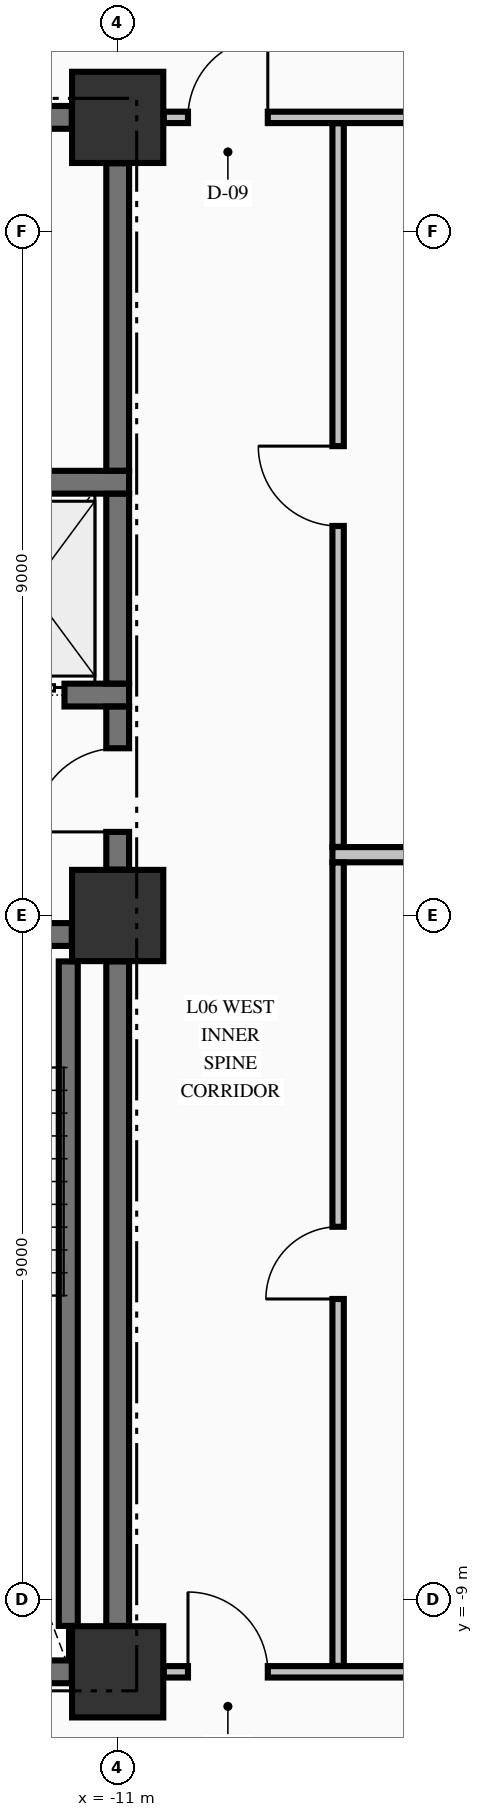
"""IFC4 building model, lengths in metres.
Left out: names, types, materials, properties, quantities, classifications, styles, units other than length and angle.
Written with IfcOpenShell. Run it as: python <this file> out.ifc"""

import sys

from ifc_helpers import new_model, si_unit, direction, frame, frame_2d, origin, origin_2d, place, context, subcontext, project, spatial, rectangle, extrude, element, fill, save


model = new_model("IFC4")
c1 = context("Model", 3, precision=1e-05, world=origin(), true_north=direction((0.0, 1.0)))
c2 = subcontext(c1, "Body", "Model", "MODEL_VIEW")
j1 = project(units=[si_unit("LENGTHUNIT", "METRE"), si_unit("PLANEANGLEUNIT", "RADIAN")], contexts=[c1])
p1 = place(None, origin())
s1 = spatial("IfcSite", under=j1, at=p1, CompositionType="ELEMENT")
p2 = place(p1, origin())
s2 = spatial("IfcBuilding", under=s1, at=p2, CompositionType="ELEMENT")
p3 = place(p2, frame((0.0, 0.0, 30.77)))
s3 = spatial("IfcBuildingStorey", under=s2, at=p3, CompositionType="ELEMENT", Elevation=30.77)
for number, where, z_axis, x_axis in (
    (1, (-11.0, -9.95, -0.25), (0.0, 0.0, 1.0), (1.0, 0.0, 0.0)),
    (2, (-11.0, 0.0, -0.25), (0.0, 0.0, 1.0), (1.0, 0.0, 0.0)),
    (3, (-11.0, 10.5, -0.25), (0.0, 0.0, 1.0), (1.0, 0.0, 0.0)),
):
    element("IfcColumn", number, at=place(p3, frame(where, z_axis=z_axis, x_axis=x_axis)), inside=s3, PredefinedType="COLUMN", context=c2, shape_type="SweptSolid", body=[
        extrude(rectangle(XDim=1.2, YDim=1.2, at=origin_2d()), origin(), (0.0, 0.0, 1.0), 3.52),
    ])
p4 = place(p3, frame((-14.7, -9.95, 0.0), z_axis=(0.0, 0.0, 1.0), x_axis=(1.0, 0.0, 0.0)))
e4 = element("IfcWall", 4, at=p4, inside=s3, PredefinedType="SHEAR", context=c2, shape_type="SweptSolid", body=[
    extrude(rectangle(XDim=3.096, YDim=0.3, at=frame_2d((1.548, 0.0))), origin(), (0.0, 0.0, 1.0), 3.27),
])
p5 = place(p3, frame((-19.396, -0.25, 0.0), z_axis=(0.0, 0.0, 1.0), x_axis=(1.0, 0.0, 0.0)))
e5 = element("IfcWall", 5, at=p5, inside=s3, PredefinedType="SHEAR", context=c2, shape_type="SweptSolid", body=[
    extrude(rectangle(XDim=7.792, YDim=0.3, at=frame_2d((3.896, 0.0))), origin(), (0.0, 0.0, 1.0), 3.27),
])
p6 = place(p5, frame((5.696, 0.0, 0.0)))
e6 = element("IfcOpeningElement", 6, at=p6, cuts=e5, PredefinedType="OPENING", context=c2, shape_type="SweptSolid", body=[
    extrude(rectangle(XDim=1.1, YDim=2.15, at=frame_2d((0.55, 1.075))), frame((0.0, 0.16, 0.0), z_axis=(0.0, -1.0, 0.0), x_axis=(1.0, 0.0, 0.0)), (0.0, 0.0, 1.0), 0.32),
])
p7 = place(p3, frame((-14.875, 2.9, 0.0), z_axis=(0.0, 0.0, 1.0), x_axis=(1.0, 0.0, 0.0)))
e7 = element("IfcWall", 7, at=p7, inside=s3, PredefinedType="SHEAR", context=c2, shape_type="SweptSolid", body=[
    extrude(rectangle(XDim=4.025, YDim=0.3, at=frame_2d((2.012, 0.0))), origin(), (0.0, 0.0, 1.0), 3.27),
])
p8 = place(p7, frame((2.075, 0.0, 0.0)))
e8 = element("IfcOpeningElement", 8, at=p8, cuts=e7, PredefinedType="OPENING", context=c2, shape_type="SweptSolid", body=[
    extrude(rectangle(XDim=1.1, YDim=2.2, at=frame_2d((0.55, 1.1))), frame((0.0, 0.16, 0.0), z_axis=(0.0, -1.0, 0.0), x_axis=(1.0, 0.0, 0.0)), (0.0, 0.0, 1.0), 0.32),
])
p9 = place(p3, frame((-14.875, 5.7, 0.0), z_axis=(0.0, 0.0, 1.0), x_axis=(1.0, 0.0, 0.0)))
e9 = element("IfcWall", 9, at=p9, inside=s3, PredefinedType="SHEAR", context=c2, shape_type="SweptSolid", body=[
    extrude(rectangle(XDim=4.025, YDim=0.3, at=frame_2d((2.012, 0.0))), origin(), (0.0, 0.0, 1.0), 3.27),
])
p10 = place(p3, frame((-14.7, 10.5, 0.0), z_axis=(0.0, 0.0, 1.0), x_axis=(1.0, 0.0, 0.0)))
e10 = element("IfcWall", 10, at=p10, inside=s3, PredefinedType="SHEAR", context=c2, shape_type="SweptSolid", body=[
    extrude(rectangle(XDim=3.096, YDim=0.3, at=frame_2d((1.548, 0.0))), origin(), (0.0, 0.0, 1.0), 3.27),
])
p11 = place(p10, frame((0.775, 0.0, 0.0)))
e11 = element("IfcOpeningElement", 11, at=p11, cuts=e10, PredefinedType="OPENING", context=c2, shape_type="SweptSolid", body=[
    extrude(rectangle(XDim=0.95, YDim=2.15, at=frame_2d((0.475, 1.075))), frame((0.0, 0.16, 0.0), z_axis=(0.0, -1.0, 0.0), x_axis=(1.0, 0.0, 0.0)), (0.0, 0.0, 1.0), 0.32),
])
p12 = place(p3, frame((-10.394, -9.95, 0.0), z_axis=(0.0, 0.0, 1.0), x_axis=(1.0, 0.0, 0.0)))
e12 = element("IfcWall", 12, at=p12, inside=s3, PredefinedType="PARTITIONING", context=c2, shape_type="SweptSolid", body=[
    extrude(rectangle(XDim=20.788, YDim=0.15, at=frame_2d((10.394, 0.0))), origin(), (0.0, 0.0, 1.0), 3.27),
])
p13 = place(p12, frame((0.319, 0.0, 0.0)))
e13 = element("IfcOpeningElement", 13, at=p13, cuts=e12, PredefinedType="OPENING", context=c2, shape_type="SweptSolid", body=[
    extrude(rectangle(XDim=1.05, YDim=2.15, at=frame_2d((0.525, 1.075))), frame((0.0, 0.085, 0.0), z_axis=(0.0, -1.0, 0.0), x_axis=(1.0, 0.0, 0.0)), (0.0, 0.0, 1.0), 0.17),
])
p14 = place(p12, frame((19.419, 0.0, 0.0)))
e14 = element("IfcOpeningElement", 14, at=p14, cuts=e12, PredefinedType="OPENING", context=c2, shape_type="SweptSolid", body=[
    extrude(rectangle(XDim=1.05, YDim=2.15, at=frame_2d((0.525, 1.075))), frame((0.0, 0.085, 0.0), z_axis=(0.0, -1.0, 0.0), x_axis=(1.0, 0.0, 0.0)), (0.0, 0.0, 1.0), 0.17),
])
p15 = place(p12, frame((11.569, 0.0, 0.0)))
e15 = element("IfcOpeningElement", 15, at=p15, cuts=e12, PredefinedType="OPENING", context=c2, shape_type="SweptSolid", body=[
    extrude(rectangle(XDim=0.95, YDim=2.15, at=frame_2d((0.475, 1.075))), frame((0.0, 0.085, 0.0), z_axis=(0.0, -1.0, 0.0), x_axis=(1.0, 0.0, 0.0)), (0.0, 0.0, 1.0), 0.17),
])
p16 = place(p3, frame((-8.175, 0.8, 0.0), z_axis=(0.0, 0.0, 1.0), x_axis=(1.0, 0.0, 0.0)))
e16 = element("IfcWall", 16, at=p16, inside=s3, PredefinedType="PARTITIONING", context=c2, shape_type="SweptSolid", body=[
    extrude(rectangle(XDim=6.475, YDim=0.2, at=frame_2d((3.238, 0.0))), origin(), (0.0, 0.0, 1.0), 3.27),
])
p17 = place(p3, frame((-10.394, 10.5, 0.0), z_axis=(0.0, 0.0, 1.0), x_axis=(1.0, 0.0, 0.0)))
e17 = element("IfcWall", 17, at=p17, inside=s3, PredefinedType="PARTITIONING", context=c2, shape_type="SweptSolid", body=[
    extrude(rectangle(XDim=20.788, YDim=0.15, at=frame_2d((10.394, 0.0))), origin(), (0.0, 0.0, 1.0), 3.27),
])
p18 = place(p17, frame((0.319, 0.0, 0.0)))
e18 = element("IfcOpeningElement", 18, at=p18, cuts=e17, PredefinedType="OPENING", context=c2, shape_type="SweptSolid", body=[
    extrude(rectangle(XDim=1.05, YDim=2.15, at=frame_2d((0.525, 1.075))), frame((0.0, 0.085, 0.0), z_axis=(0.0, -1.0, 0.0), x_axis=(1.0, 0.0, 0.0)), (0.0, 0.0, 1.0), 0.17),
])
p19 = place(p17, frame((19.419, 0.0, 0.0)))
e19 = element("IfcOpeningElement", 19, at=p19, cuts=e17, PredefinedType="OPENING", context=c2, shape_type="SweptSolid", body=[
    extrude(rectangle(XDim=1.05, YDim=2.15, at=frame_2d((0.525, 1.075))), frame((0.0, 0.085, 0.0), z_axis=(0.0, -1.0, 0.0), x_axis=(1.0, 0.0, 0.0)), (0.0, 0.0, 1.0), 0.17),
])
p20 = place(p3, frame((-11.65, -9.346, 0.0), z_axis=(0.0, 0.0, 1.0), x_axis=(0.0, 1.0, 0.0)))
e20 = element("IfcWall", 20, at=p20, inside=s3, PredefinedType="SOLIDWALL", context=c2, shape_type="SweptSolid", body=[
    extrude(rectangle(XDim=8.742, YDim=0.25, at=frame_2d((4.371, 0.0))), origin(), (0.0, 0.0, 1.0), 3.27),
])
p21 = place(p3, frame((-11.0, -9.346, 0.0), z_axis=(0.0, 0.0, 1.0), x_axis=(0.0, 1.0, 0.0)))
e21 = element("IfcWall", 21, at=p21, inside=s3, PredefinedType="SHEAR", context=c2, shape_type="SweptSolid", body=[
    extrude(rectangle(XDim=8.742, YDim=0.3, at=frame_2d((4.371, 0.0))), origin(), (0.0, 0.0, 1.0), 3.27),
])
p22 = place(p3, frame((-11.0, 0.604, 0.0), z_axis=(0.0, 0.0, 1.0), x_axis=(0.0, 1.0, 0.0)))
e22 = element("IfcWall", 22, at=p22, inside=s3, PredefinedType="SHEAR", context=c2, shape_type="SweptSolid", body=[
    extrude(rectangle(XDim=2.144, YDim=0.3, at=frame_2d((1.072, 0.0))), origin(), (0.0, 0.0, 1.0), 3.27),
])
p23 = place(p22, frame((0.496, 0.0, 0.0)))
e23 = element("IfcOpeningElement", 23, at=p23, cuts=e22, PredefinedType="OPENING", context=c2, shape_type="SweptSolid", body=[
    extrude(rectangle(XDim=1.1, YDim=2.15, at=frame_2d((0.55, 1.075))), frame((0.0, 0.16, 0.0), z_axis=(0.0, -1.0, 0.0), x_axis=(1.0, 0.0, 0.0)), (0.0, 0.0, 1.0), 0.32),
])
p24 = place(p3, frame((-11.0, 3.052, 0.0), z_axis=(0.0, 0.0, 1.0), x_axis=(0.0, 1.0, 0.0)))
e24 = element("IfcWall", 24, at=p24, inside=s3, PredefinedType="SHEAR", context=c2, shape_type="SweptSolid", body=[
    extrude(rectangle(XDim=2.496, YDim=0.3, at=frame_2d((1.248, 0.0))), origin(), (0.0, 0.0, 1.0), 3.27),
])
p25 = place(p3, frame((-11.0, 5.852, 0.0), z_axis=(0.0, 0.0, 1.0), x_axis=(0.0, 1.0, 0.0)))
e25 = element("IfcWall", 25, at=p25, inside=s3, PredefinedType="SHEAR", context=c2, shape_type="SweptSolid", body=[
    extrude(rectangle(XDim=4.044, YDim=0.3, at=frame_2d((2.022, 0.0))), origin(), (0.0, 0.0, 1.0), 3.27),
])
p26 = place(p3, frame((-8.1, -9.872, 0.0), z_axis=(0.0, 0.0, 1.0), x_axis=(0.0, 1.0, 0.0)))
e26 = element("IfcWall", 26, at=p26, inside=s3, PredefinedType="PARTITIONING", context=c2, shape_type="SweptSolid", body=[
    extrude(rectangle(XDim=10.569, YDim=0.15, at=frame_2d((5.285, 0.0))), origin(), (0.0, 0.0, 1.0), 3.27),
])
p27 = place(p26, frame((4.827, 0.0, 0.0)))
e27 = element("IfcOpeningElement", 27, at=p27, cuts=e26, PredefinedType="OPENING", context=c2, shape_type="SweptSolid", body=[
    extrude(rectangle(XDim=0.95, YDim=2.15, at=frame_2d((0.475, 1.075))), frame((0.0, 0.085, 0.0), z_axis=(0.0, -1.0, 0.0), x_axis=(1.0, 0.0, 0.0)), (0.0, 0.0, 1.0), 0.17),
])
p28 = place(p3, frame((-8.1, 0.903, 0.0), z_axis=(0.0, 0.0, 1.0), x_axis=(0.0, 1.0, 0.0)))
e28 = element("IfcWall", 28, at=p28, inside=s3, PredefinedType="PARTITIONING", context=c2, shape_type="SweptSolid", body=[
    extrude(rectangle(XDim=9.519, YDim=0.15, at=frame_2d((4.76, 0.0))), origin(), (0.0, 0.0, 1.0), 3.27),
])
p29 = place(p28, frame((4.222, 0.0, 0.0)))
e29 = element("IfcOpeningElement", 29, at=p29, cuts=e28, PredefinedType="OPENING", context=c2, shape_type="SweptSolid", body=[
    extrude(rectangle(XDim=1.05, YDim=2.15, at=frame_2d((0.525, 1.075))), frame((0.0, 0.085, 0.0), z_axis=(0.0, -1.0, 0.0), x_axis=(1.0, 0.0, 0.0)), (0.0, 0.0, 1.0), 0.17),
])
p30 = place(p23, origin())
e30 = element("IfcDoor", 30, at=p30, inside=s3, OperationType="SINGLE_SWING_LEFT", PredefinedType="DOOR", context=c2, shape_type="SweptSolid", body=[
    extrude(rectangle(XDim=1.1, YDim=2.15, at=frame_2d((0.55, 1.075))), frame((0.0, 0.025, 0.0), z_axis=(0.0, -1.0, 0.0), x_axis=(1.0, 0.0, 0.0)), (0.0, 0.0, 1.0), 0.05),
])
fill(e23, e30)
p31 = place(p8, origin())
e31 = element("IfcDoor", 31, at=p31, inside=s3, OperationType="SLIDING_TO_LEFT", PredefinedType="DOOR", context=c2, shape_type="SweptSolid", body=[
    extrude(rectangle(XDim=1.1, YDim=2.2, at=frame_2d((0.55, 1.1))), frame((0.0, 0.025, 0.0), z_axis=(0.0, -1.0, 0.0), x_axis=(1.0, 0.0, 0.0)), (0.0, 0.0, 1.0), 0.05),
])
fill(e8, e31)
p32 = place(p18, origin())
e32 = element("IfcDoor", 32, at=p32, inside=s3, OperationType="SINGLE_SWING_RIGHT", PredefinedType="DOOR", context=c2, shape_type="SweptSolid", body=[
    extrude(rectangle(XDim=1.05, YDim=2.15, at=frame_2d((0.525, 1.075))), frame((0.0, 0.025, 0.0), z_axis=(0.0, -1.0, 0.0), x_axis=(1.0, 0.0, 0.0)), (0.0, 0.0, 1.0), 0.05),
])
fill(e18, e32)
p33 = place(p13, origin())
e33 = element("IfcDoor", 33, at=p33, inside=s3, OperationType="SINGLE_SWING_LEFT", PredefinedType="DOOR", context=c2, shape_type="SweptSolid", body=[
    extrude(rectangle(XDim=1.05, YDim=2.15, at=frame_2d((0.525, 1.075))), frame((0.0, 0.025, 0.0), z_axis=(0.0, -1.0, 0.0), x_axis=(1.0, 0.0, 0.0)), (0.0, 0.0, 1.0), 0.05),
])
fill(e13, e33)
p34 = place(p29, origin())
e34 = element("IfcDoor", 34, at=p34, inside=s3, OperationType="SINGLE_SWING_RIGHT", PredefinedType="DOOR", context=c2, shape_type="SweptSolid", body=[
    extrude(rectangle(XDim=1.05, YDim=2.15, at=frame_2d((0.525, 1.075))), frame((0.0, 0.025, 0.0), z_axis=(0.0, -1.0, 0.0), x_axis=(1.0, 0.0, 0.0)), (0.0, 0.0, 1.0), 0.05),
])
fill(e29, e34)
p35 = place(p27, origin())
e35 = element("IfcDoor", 35, at=p35, inside=s3, OperationType="SINGLE_SWING_LEFT", PredefinedType="DOOR", context=c2, shape_type="SweptSolid", body=[
    extrude(rectangle(XDim=0.95, YDim=2.15, at=frame_2d((0.475, 1.075))), frame((0.0, 0.025, 0.0), z_axis=(0.0, -1.0, 0.0), x_axis=(1.0, 0.0, 0.0)), (0.0, 0.0, 1.0), 0.05),
])
fill(e27, e35)
save(model, sys.argv[1])
